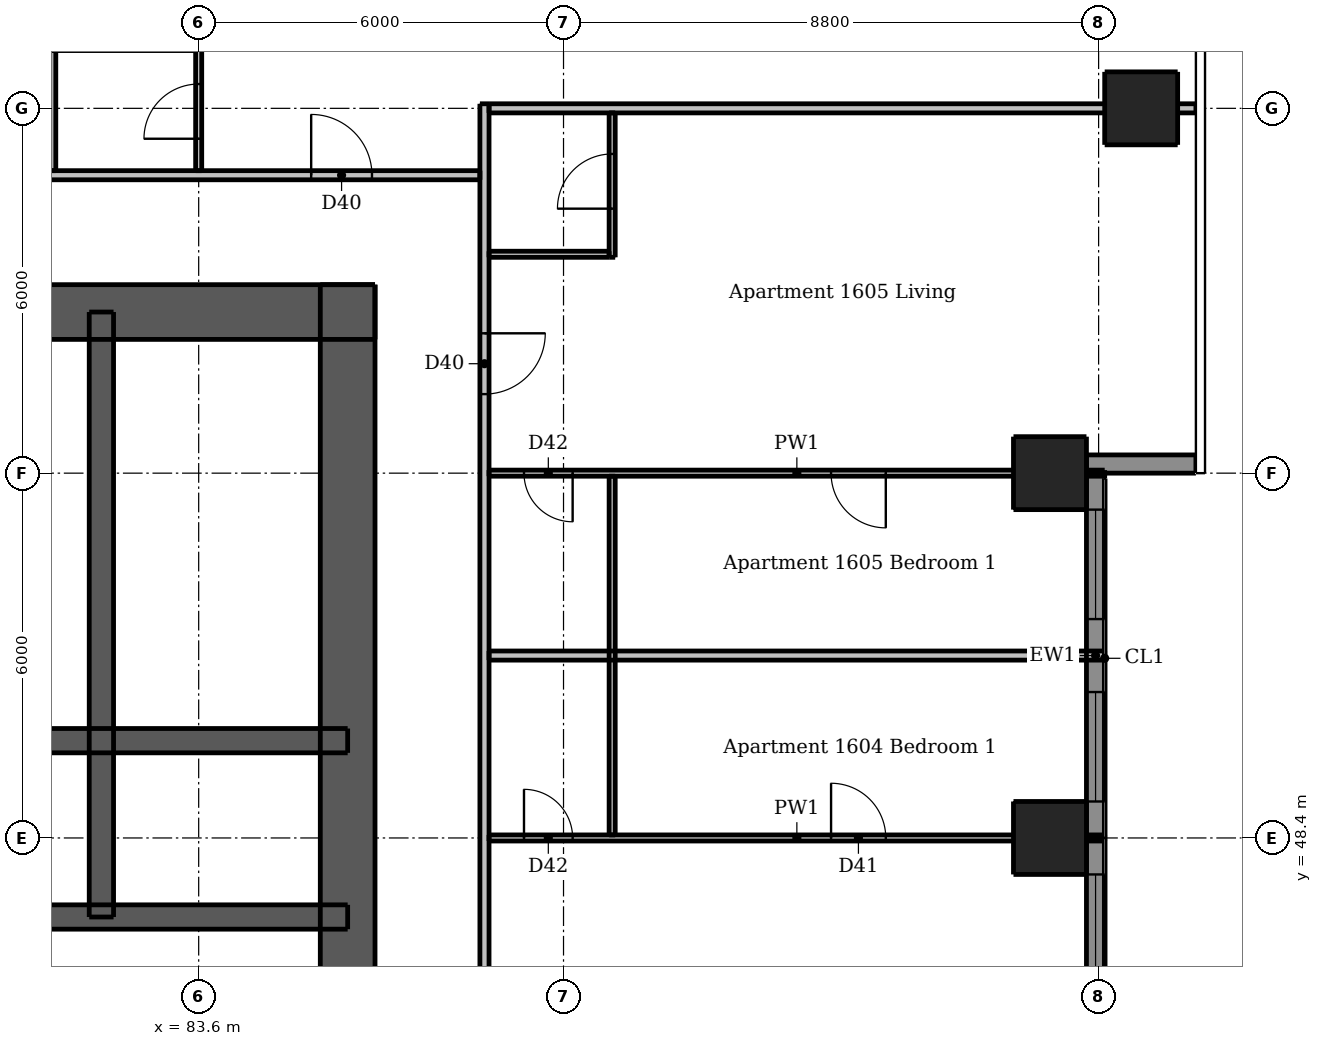
"""IFC4 building model, lengths in metres.
Left out: names, types, materials, properties, quantities, classifications, styles, units other than length and angle.
Written with IfcOpenShell. Run it as: python <this file> out.ifc"""

import sys

from ifc_helpers import new_model, si_unit, direction, frame, frame_2d, origin, origin_2d, place, context, subcontext, project, spatial, rectangle, extrude, element, fill, save


model = new_model("IFC4")
c1 = context("Model", 3, precision=1e-05, world=origin(), true_north=direction((0.0, 1.0)))
c2 = subcontext(c1, "Body", "Model", "MODEL_VIEW")
j1 = project(units=[si_unit("LENGTHUNIT", "METRE"), si_unit("PLANEANGLEUNIT", "RADIAN")], contexts=[c1])
p1 = place(None, origin())
s1 = spatial("IfcSite", under=j1, at=p1, CompositionType="ELEMENT")
p2 = place(p1, origin())
s2 = spatial("IfcBuilding", under=s1, at=p2, CompositionType="ELEMENT")
p3 = place(p2, frame((0.0, 0.0, 59.8)))
s3 = spatial("IfcBuildingStorey", under=s2, at=p3, CompositionType="ELEMENT", Elevation=59.8)
p4 = place(p3, frame((62.5, 57.05, 0.0), z_axis=(0.0, 0.0, 1.0), x_axis=(1.0, 0.0, 0.0)))
e1 = element("IfcWall", 1, at=p4, inside=s3, PredefinedType="SHEAR", context=c2, shape_type="SweptSolid", body=[
    extrude(rectangle(XDim=24.0, YDim=0.9, at=frame_2d((12.0, 0.0))), origin(), (0.0, 0.0, 1.0), 3.05),
])
p5 = place(p4, frame((20.85, 0.0, 0.0)))
e2 = element("IfcOpeningElement", 2, at=p5, cuts=e1, PredefinedType="OPENING", context=c2, shape_type="SweptSolid", body=[
    extrude(rectangle(XDim=1.1, YDim=2.1, at=frame_2d((0.55, 1.05))), frame((0.0, 0.46, 0.0), z_axis=(0.0, -1.0, 0.0), x_axis=(1.0, 0.0, 0.0)), (0.0, 0.0, 1.0), 0.92),
])
p6 = place(p4, frame((2.05, 0.0, 0.0)))
e3 = element("IfcOpeningElement", 3, at=p6, cuts=e1, PredefinedType="OPENING", context=c2, shape_type="SweptSolid", body=[
    extrude(rectangle(XDim=1.1, YDim=2.1, at=frame_2d((0.55, 1.05))), frame((0.0, 0.46, 0.0), z_axis=(0.0, -1.0, 0.0), x_axis=(1.0, 0.0, 0.0)), (0.0, 0.0, 1.0), 0.92),
])
p7 = place(p4, frame((6.44, 0.0, 0.0)))
e4 = element("IfcOpeningElement", 4, at=p7, cuts=e1, PredefinedType="OPENING", context=c2, shape_type="SweptSolid", body=[
    extrude(rectangle(XDim=0.9, YDim=2.1, at=frame_2d((0.45, 1.05))), frame((0.0, 0.46, 0.0), z_axis=(0.0, -1.0, 0.0), x_axis=(1.0, 0.0, 0.0)), (0.0, 0.0, 1.0), 0.92),
])
p8 = place(p4, frame((13.74, 0.0, 0.0)))
e5 = element("IfcOpeningElement", 5, at=p8, cuts=e1, PredefinedType="OPENING", context=c2, shape_type="SweptSolid", body=[
    extrude(rectangle(XDim=0.9, YDim=2.1, at=frame_2d((0.45, 1.05))), frame((0.0, 0.46, 0.0), z_axis=(0.0, -1.0, 0.0), x_axis=(1.0, 0.0, 0.0)), (0.0, 0.0, 1.0), 0.92),
])
p9 = place(p3, frame((86.05, 33.5, 0.0), z_axis=(0.0, 0.0, 1.0), x_axis=(0.0, 1.0, 0.0)))
e6 = element("IfcWall", 6, at=p9, inside=s3, PredefinedType="SHEAR", context=c2, shape_type="SweptSolid", body=[
    extrude(rectangle(XDim=24.0, YDim=0.9, at=frame_2d((12.0, 0.0))), origin(), (0.0, 0.0, 1.0), 3.05),
])
p10 = place(p9, frame((11.2, 0.0, 0.0)))
e7 = element("IfcOpeningElement", 7, at=p10, cuts=e6, PredefinedType="OPENING", context=c2, shape_type="SweptSolid", body=[
    extrude(rectangle(XDim=1.6, YDim=2.1, at=frame_2d((0.8, 1.05))), frame((0.0, 0.46, 0.0), z_axis=(0.0, -1.0, 0.0), x_axis=(1.0, 0.0, 0.0)), (0.0, 0.0, 1.0), 0.92),
])
p11 = place(p3, frame((62.95, 47.1, 0.0), z_axis=(0.0, 0.0, 1.0), x_axis=(1.0, 0.0, 0.0)))
e8 = element("IfcWall", 8, at=p11, inside=s3, PredefinedType="SHEAR", context=c2, shape_type="SweptSolid", body=[
    extrude(rectangle(XDim=23.1, YDim=0.4, at=frame_2d((11.55, 0.0))), origin(), (0.0, 0.0, 1.0), 3.05),
])
p12 = place(p11, frame((0.662, 0.0, 0.0)))
e9 = element("IfcOpeningElement", 9, at=p12, cuts=e8, PredefinedType="OPENING", context=c2, shape_type="SweptSolid", body=[
    extrude(rectangle(XDim=0.8, YDim=2.1, at=frame_2d((0.4, 1.05))), frame((0.0, 0.21, 0.0), z_axis=(0.0, -1.0, 0.0), x_axis=(1.0, 0.0, 0.0)), (0.0, 0.0, 1.0), 0.42),
])
p13 = place(p11, frame((2.312, 0.0, 0.0)))
e10 = element("IfcOpeningElement", 10, at=p13, cuts=e8, PredefinedType="OPENING", context=c2, shape_type="SweptSolid", body=[
    extrude(rectangle(XDim=0.9, YDim=2.1, at=frame_2d((0.45, 1.05))), frame((0.0, 0.21, 0.0), z_axis=(0.0, -1.0, 0.0), x_axis=(1.0, 0.0, 0.0)), (0.0, 0.0, 1.0), 0.42),
])
p14 = place(p11, frame((20.5, 0.0, 0.0)))
e11 = element("IfcOpeningElement", 11, at=p14, cuts=e8, PredefinedType="OPENING", context=c2, shape_type="SweptSolid", body=[
    extrude(rectangle(XDim=0.9, YDim=2.1, at=frame_2d((0.45, 1.05))), frame((0.0, 0.21, 0.0), z_axis=(0.0, -1.0, 0.0), x_axis=(1.0, 0.0, 0.0)), (0.0, 0.0, 1.0), 0.42),
])
p15 = place(p3, frame((62.95, 50.0, 0.0), z_axis=(0.0, 0.0, 1.0), x_axis=(1.0, 0.0, 0.0)))
e12 = element("IfcWall", 12, at=p15, inside=s3, PredefinedType="SHEAR", context=c2, shape_type="SweptSolid", body=[
    extrude(rectangle(XDim=23.1, YDim=0.4, at=frame_2d((11.55, 0.0))), origin(), (0.0, 0.0, 1.0), 3.05),
])
p16 = place(p3, frame((82.0, 47.1, 0.0), z_axis=(0.0, 0.0, 1.0), x_axis=(0.0, 1.0, 0.0)))
e13 = element("IfcWall", 13, at=p16, inside=s3, PredefinedType="SHEAR", context=c2, shape_type="SweptSolid", body=[
    extrude(rectangle(XDim=9.95, YDim=0.4, at=frame_2d((4.975, 0.0))), origin(), (0.0, 0.0, 1.0), 3.05),
])
for number, where, z_axis, x_axis in (
    (14, (97.6, 48.4, 0.0), (0.0, 0.0, 1.0), (1.0, 0.0, 0.0)),
    (15, (97.6, 54.4, 0.0), (0.0, 0.0, 1.0), (1.0, 0.0, 0.0)),
    (16, (99.1, 60.4, 0.0), (0.0, 0.0, 1.0), (1.0, 0.0, 0.0)),
):
    element("IfcColumn", number, at=place(p3, frame(where, z_axis=z_axis, x_axis=x_axis)), inside=s3, PredefinedType="COLUMN", context=c2, shape_type="SweptSolid", body=[
        extrude(rectangle(XDim=1.2, YDim=1.2, at=origin_2d()), origin(), (0.0, 0.0, 1.0), 3.05),
    ])
p17 = place(p3, frame((98.2, 54.55, 0.0), z_axis=(0.0, 0.0, 1.0), x_axis=(1.0, 0.0, 0.0)))
e17 = element("IfcWall", 17, at=p17, inside=s3, PredefinedType="SOLIDWALL", context=c2, shape_type="SweptSolid", body=[
    extrude(rectangle(XDim=1.8, YDim=0.3, at=frame_2d((0.9, 0.0))), origin(), (0.0, 0.0, 1.0), 3.05),
])
p18 = place(p3, frame((98.35, 42.7, 0.0), z_axis=(0.0, 0.0, 1.0), x_axis=(0.0, 1.0, 0.0)))
e18 = element("IfcWall", 18, at=p18, inside=s3, PredefinedType="SOLIDWALL", context=c2, shape_type="SweptSolid", body=[
    extrude(rectangle(XDim=5.7, YDim=0.3, at=frame_2d((2.85, 0.0))), origin(), (0.0, 0.0, 1.0), 3.05),
])
p19 = place(p18, frame((0.3, 0.0, 0.15)))
e19 = element("IfcOpeningElement", 19, at=p19, cuts=e18, PredefinedType="OPENING", context=c2, shape_type="SweptSolid", body=[
    extrude(rectangle(XDim=1.8, YDim=2.1, at=frame_2d((0.9, 1.05))), frame((0.0, 0.16, 0.0), z_axis=(0.0, -1.0, 0.0), x_axis=(1.0, 0.0, 0.0)), (0.0, 0.0, 1.0), 0.32),
])
p20 = place(p18, frame((3.3, 0.0, 0.15)))
e20 = element("IfcOpeningElement", 20, at=p20, cuts=e18, PredefinedType="OPENING", context=c2, shape_type="SweptSolid", body=[
    extrude(rectangle(XDim=1.8, YDim=2.1, at=frame_2d((0.9, 1.05))), frame((0.0, 0.16, 0.0), z_axis=(0.0, -1.0, 0.0), x_axis=(1.0, 0.0, 0.0)), (0.0, 0.0, 1.0), 0.32),
])
p21 = place(p3, frame((98.35, 48.4, 0.0), z_axis=(0.0, 0.0, 1.0), x_axis=(0.0, 1.0, 0.0)))
e21 = element("IfcWall", 21, at=p21, inside=s3, PredefinedType="SOLIDWALL", context=c2, shape_type="SweptSolid", body=[
    extrude(rectangle(XDim=6.0, YDim=0.3, at=frame_2d((3.0, 0.0))), origin(), (0.0, 0.0, 1.0), 3.05),
])
p22 = place(p21, frame((0.6, 0.0, 0.15)))
e22 = element("IfcOpeningElement", 22, at=p22, cuts=e21, PredefinedType="OPENING", context=c2, shape_type="SweptSolid", body=[
    extrude(rectangle(XDim=1.8, YDim=2.1, at=frame_2d((0.9, 1.05))), frame((0.0, 0.16, 0.0), z_axis=(0.0, -1.0, 0.0), x_axis=(1.0, 0.0, 0.0)), (0.0, 0.0, 1.0), 0.32),
])
p23 = place(p21, frame((3.6, 0.0, 0.15)))
e23 = element("IfcOpeningElement", 23, at=p23, cuts=e21, PredefinedType="OPENING", context=c2, shape_type="SweptSolid", body=[
    extrude(rectangle(XDim=1.8, YDim=2.1, at=frame_2d((0.9, 1.05))), frame((0.0, 0.16, 0.0), z_axis=(0.0, -1.0, 0.0), x_axis=(1.0, 0.0, 0.0)), (0.0, 0.0, 1.0), 0.32),
])
p24 = place(p3, frame((81.2, 59.375, 0.0), z_axis=(0.0, 0.0, 1.0), x_axis=(0.0, 1.0, 0.0)))
e24 = element("IfcWall", 24, at=p24, inside=s3, PredefinedType="PARTITIONING", context=c2, shape_type="SweptSolid", body=[
    extrude(rectangle(XDim=1.975, YDim=0.1, at=frame_2d((0.988, 0.0))), origin(), (0.0, 0.0, 1.0), 3.05),
])
p25 = place(p3, frame((83.6, 59.375, 0.0), z_axis=(0.0, 0.0, 1.0), x_axis=(0.0, 1.0, 0.0)))
e25 = element("IfcWall", 25, at=p25, inside=s3, PredefinedType="PARTITIONING", context=c2, shape_type="SweptSolid", body=[
    extrude(rectangle(XDim=8.625, YDim=0.1, at=frame_2d((4.312, 0.0))), origin(), (0.0, 0.0, 1.0), 2.516),
])
p26 = place(p25, frame((0.525, 0.0, 0.0)))
e26 = element("IfcOpeningElement", 26, at=p26, cuts=e25, PredefinedType="OPENING", context=c2, shape_type="SweptSolid", body=[
    extrude(rectangle(XDim=0.9, YDim=2.1, at=frame_2d((0.45, 1.05))), frame((0.0, 0.06, 0.0), z_axis=(0.0, -1.0, 0.0), x_axis=(1.0, 0.0, 0.0)), (0.0, 0.0, 1.0), 0.12),
])
p27 = place(p25, frame((4.875, 0.0, 0.0)))
e27 = element("IfcOpeningElement", 27, at=p27, cuts=e25, PredefinedType="OPENING", context=c2, shape_type="SweptSolid", body=[
    extrude(rectangle(XDim=0.9, YDim=2.1, at=frame_2d((0.45, 1.05))), frame((0.0, 0.06, 0.0), z_axis=(0.0, -1.0, 0.0), x_axis=(1.0, 0.0, 0.0)), (0.0, 0.0, 1.0), 0.12),
])
p28 = place(p3, frame((90.4, 48.45, 0.0), z_axis=(0.0, 0.0, 1.0), x_axis=(0.0, 1.0, 0.0)))
e28 = element("IfcWall", 28, at=p28, inside=s3, PredefinedType="PARTITIONING", context=c2, shape_type="SweptSolid", body=[
    extrude(rectangle(XDim=5.9, YDim=0.1, at=frame_2d((2.95, 0.0))), origin(), (0.0, 0.0, 1.0), 3.05),
])
p29 = place(p3, frame((90.4, 57.95, 0.0), z_axis=(0.0, 0.0, 1.0), x_axis=(0.0, 1.0, 0.0)))
e29 = element("IfcWall", 29, at=p29, inside=s3, PredefinedType="PARTITIONING", context=c2, shape_type="SweptSolid", body=[
    extrude(rectangle(XDim=2.375, YDim=0.1, at=frame_2d((1.188, 0.0))), origin(), (0.0, 0.0, 1.0), 3.05),
])
p30 = place(p29, frame((0.8, 0.0, 0.0)))
e30 = element("IfcOpeningElement", 30, at=p30, cuts=e29, PredefinedType="OPENING", context=c2, shape_type="SweptSolid", body=[
    extrude(rectangle(XDim=0.9, YDim=2.1, at=frame_2d((0.45, 1.05))), frame((0.0, 0.06, 0.0), z_axis=(0.0, -1.0, 0.0), x_axis=(1.0, 0.0, 0.0)), (0.0, 0.0, 1.0), 0.12),
])
p31 = place(p3, frame((88.375, 58.0, 0.0), z_axis=(0.0, 0.0, 1.0), x_axis=(1.0, 0.0, 0.0)))
e31 = element("IfcWall", 31, at=p31, inside=s3, PredefinedType="PARTITIONING", context=c2, shape_type="SweptSolid", body=[
    extrude(rectangle(XDim=1.975, YDim=0.1, at=frame_2d((0.988, 0.0))), origin(), (0.0, 0.0, 1.0), 3.05),
])
p32 = place(p3, frame((98.5, 54.4, 0.0), z_axis=(0.0, 0.0, 1.0), x_axis=(-1.0, 0.0, 0.0)))
e32 = element("IfcWall", 32, at=p32, inside=s3, PredefinedType="PARTITIONING", context=c2, shape_type="SweptSolid", body=[
    extrude(rectangle(XDim=10.125, YDim=0.1, at=frame_2d((5.062, 0.0))), origin(), (0.0, 0.0, 1.0), 2.516),
])
p33 = place(p32, frame((3.6, 0.0, 0.0)))
e33 = element("IfcOpeningElement", 33, at=p33, cuts=e32, PredefinedType="OPENING", context=c2, shape_type="SweptSolid", body=[
    extrude(rectangle(XDim=0.9, YDim=2.1, at=frame_2d((0.45, 1.05))), frame((0.0, 0.06, 0.0), z_axis=(0.0, -1.0, 0.0), x_axis=(1.0, 0.0, 0.0)), (0.0, 0.0, 1.0), 0.12),
])
p34 = place(p32, frame((8.75, 0.0, 0.0)))
e34 = element("IfcOpeningElement", 34, at=p34, cuts=e32, PredefinedType="OPENING", context=c2, shape_type="SweptSolid", body=[
    extrude(rectangle(XDim=0.8, YDim=2.1, at=frame_2d((0.4, 1.05))), frame((0.0, 0.06, 0.0), z_axis=(0.0, -1.0, 0.0), x_axis=(1.0, 0.0, 0.0)), (0.0, 0.0, 1.0), 0.12),
])
p35 = place(p3, frame((88.375, 48.4, 0.0), z_axis=(0.0, 0.0, 1.0), x_axis=(1.0, 0.0, 0.0)))
e35 = element("IfcWall", 35, at=p35, inside=s3, PredefinedType="PARTITIONING", context=c2, shape_type="SweptSolid", body=[
    extrude(rectangle(XDim=10.125, YDim=0.1, at=frame_2d((5.062, 0.0))), origin(), (0.0, 0.0, 1.0), 2.516),
])
p36 = place(p35, frame((5.625, 0.0, 0.0)))
e36 = element("IfcOpeningElement", 36, at=p36, cuts=e35, PredefinedType="OPENING", context=c2, shape_type="SweptSolid", body=[
    extrude(rectangle(XDim=0.9, YDim=2.1, at=frame_2d((0.45, 1.05))), frame((0.0, 0.06, 0.0), z_axis=(0.0, -1.0, 0.0), x_axis=(1.0, 0.0, 0.0)), (0.0, 0.0, 1.0), 0.12),
])
p37 = place(p35, frame((0.575, 0.0, 0.0)))
e37 = element("IfcOpeningElement", 37, at=p37, cuts=e35, PredefinedType="OPENING", context=c2, shape_type="SweptSolid", body=[
    extrude(rectangle(XDim=0.8, YDim=2.1, at=frame_2d((0.4, 1.05))), frame((0.0, 0.06, 0.0), z_axis=(0.0, -1.0, 0.0), x_axis=(1.0, 0.0, 0.0)), (0.0, 0.0, 1.0), 0.12),
])
p38 = place(p3, frame((88.3, 60.475, 0.0), z_axis=(0.0, 0.0, 1.0), x_axis=(0.0, -1.0, 0.0)))
e38 = element("IfcWall", 38, at=p38, inside=s3, PredefinedType="PARTITIONING", context=c2, shape_type="SweptSolid", body=[
    extrude(rectangle(XDim=28.7, YDim=0.15, at=frame_2d((14.35, 0.0))), origin(), (0.0, 0.0, 1.0), 3.05),
])
p39 = place(p38, frame((27.425, 0.0, 0.0)))
e39 = element("IfcOpeningElement", 39, at=p39, cuts=e38, PredefinedType="OPENING", context=c2, shape_type="SweptSolid", body=[
    extrude(rectangle(XDim=1.0, YDim=2.1, at=frame_2d((0.5, 1.05))), frame((0.0, 0.085, 0.0), z_axis=(0.0, -1.0, 0.0), x_axis=(1.0, 0.0, 0.0)), (0.0, 0.0, 1.0), 0.17),
])
p40 = place(p38, frame((14.525, 0.0, 0.0)))
e40 = element("IfcOpeningElement", 40, at=p40, cuts=e38, PredefinedType="OPENING", context=c2, shape_type="SweptSolid", body=[
    extrude(rectangle(XDim=1.0, YDim=2.1, at=frame_2d((0.5, 1.05))), frame((0.0, 0.085, 0.0), z_axis=(0.0, -1.0, 0.0), x_axis=(1.0, 0.0, 0.0)), (0.0, 0.0, 1.0), 0.17),
])
p41 = place(p38, frame((3.775, 0.0, 0.0)))
e41 = element("IfcOpeningElement", 41, at=p41, cuts=e38, PredefinedType="OPENING", context=c2, shape_type="SweptSolid", body=[
    extrude(rectangle(XDim=1.0, YDim=2.1, at=frame_2d((0.5, 1.05))), frame((0.0, 0.085, 0.0), z_axis=(0.0, -1.0, 0.0), x_axis=(1.0, 0.0, 0.0)), (0.0, 0.0, 1.0), 0.17),
])
p42 = place(p3, frame((88.375, 60.4, 0.0), z_axis=(0.0, 0.0, 1.0), x_axis=(1.0, 0.0, 0.0)))
e42 = element("IfcWall", 42, at=p42, inside=s3, PredefinedType="PARTITIONING", context=c2, shape_type="SweptSolid", body=[
    extrude(rectangle(XDim=11.625, YDim=0.15, at=frame_2d((5.812, 0.0))), origin(), (0.0, 0.0, 1.0), 2.516),
])
p43 = place(p3, frame((59.675, 59.3, 0.0), z_axis=(0.0, 0.0, 1.0), x_axis=(1.0, 0.0, 0.0)))
e43 = element("IfcWall", 43, at=p43, inside=s3, PredefinedType="PARTITIONING", context=c2, shape_type="SweptSolid", body=[
    extrude(rectangle(XDim=28.55, YDim=0.15, at=frame_2d((14.275, 0.0))), origin(), (0.0, 0.0, 1.0), 3.05),
])
p44 = place(p43, frame((3.625, 0.0, 0.0)))
e44 = element("IfcOpeningElement", 44, at=p44, cuts=e43, PredefinedType="OPENING", context=c2, shape_type="SweptSolid", body=[
    extrude(rectangle(XDim=1.0, YDim=2.1, at=frame_2d((0.5, 1.05))), frame((0.0, 0.085, 0.0), z_axis=(0.0, -1.0, 0.0), x_axis=(1.0, 0.0, 0.0)), (0.0, 0.0, 1.0), 0.17),
])
p45 = place(p43, frame((14.425, 0.0, 0.0)))
e45 = element("IfcOpeningElement", 45, at=p45, cuts=e43, PredefinedType="OPENING", context=c2, shape_type="SweptSolid", body=[
    extrude(rectangle(XDim=1.0, YDim=2.1, at=frame_2d((0.5, 1.05))), frame((0.0, 0.085, 0.0), z_axis=(0.0, -1.0, 0.0), x_axis=(1.0, 0.0, 0.0)), (0.0, 0.0, 1.0), 0.17),
])
p46 = place(p43, frame((25.775, 0.0, 0.0)))
e46 = element("IfcOpeningElement", 46, at=p46, cuts=e43, PredefinedType="OPENING", context=c2, shape_type="SweptSolid", body=[
    extrude(rectangle(XDim=1.0, YDim=2.1, at=frame_2d((0.5, 1.05))), frame((0.0, 0.085, 0.0), z_axis=(0.0, -1.0, 0.0), x_axis=(1.0, 0.0, 0.0)), (0.0, 0.0, 1.0), 0.17),
])
p47 = place(p3, frame((88.375, 51.4, 0.0), z_axis=(0.0, 0.0, 1.0), x_axis=(1.0, 0.0, 0.0)))
e47 = element("IfcWall", 47, at=p47, inside=s3, PredefinedType="PARTITIONING", context=c2, shape_type="SweptSolid", body=[
    extrude(rectangle(XDim=10.125, YDim=0.15, at=frame_2d((5.062, 0.0))), origin(), (0.0, 0.0, 1.0), 3.05),
])
p48 = place(p20, origin())
e48 = element("IfcWindow", 48, at=p48, inside=s3, PartitioningType="DOUBLE_PANEL_VERTICAL", PredefinedType="WINDOW", context=c2, shape_type="SweptSolid", body=[
    extrude(rectangle(XDim=1.8, YDim=2.1, at=frame_2d((0.9, 1.05))), frame((0.0, 0.03, 0.0), z_axis=(0.0, -1.0, 0.0), x_axis=(1.0, 0.0, 0.0)), (0.0, 0.0, 1.0), 0.06),
])
fill(e20, e48)
p49 = place(p22, origin())
e49 = element("IfcWindow", 49, at=p49, inside=s3, PartitioningType="DOUBLE_PANEL_VERTICAL", PredefinedType="WINDOW", context=c2, shape_type="SweptSolid", body=[
    extrude(rectangle(XDim=1.8, YDim=2.1, at=frame_2d((0.9, 1.05))), frame((0.0, 0.03, 0.0), z_axis=(0.0, -1.0, 0.0), x_axis=(1.0, 0.0, 0.0)), (0.0, 0.0, 1.0), 0.06),
])
fill(e22, e49)
p50 = place(p23, origin())
e50 = element("IfcWindow", 50, at=p50, inside=s3, PartitioningType="DOUBLE_PANEL_VERTICAL", PredefinedType="WINDOW", context=c2, shape_type="SweptSolid", body=[
    extrude(rectangle(XDim=1.8, YDim=2.1, at=frame_2d((0.9, 1.05))), frame((0.0, 0.03, 0.0), z_axis=(0.0, -1.0, 0.0), x_axis=(1.0, 0.0, 0.0)), (0.0, 0.0, 1.0), 0.06),
])
fill(e23, e50)
p51 = place(p5, origin())
e51 = element("IfcDoor", 51, at=p51, inside=s3, OperationType="SINGLE_SWING_RIGHT", PredefinedType="DOOR", context=c2, shape_type="SweptSolid", body=[
    extrude(rectangle(XDim=1.1, YDim=2.1, at=frame_2d((0.55, 1.05))), frame((0.0, -0.388, 0.0), z_axis=(0.0, -1.0, 0.0), x_axis=(1.0, 0.0, 0.0)), (0.0, 0.0, 1.0), 0.05),
])
fill(e2, e51)
p52 = place(p14, origin())
e52 = element("IfcDoor", 52, at=p52, inside=s3, OperationType="SINGLE_SWING_LEFT", PredefinedType="DOOR", context=c2, shape_type="SweptSolid", body=[
    extrude(rectangle(XDim=0.9, YDim=2.1, at=frame_2d((0.45, 1.05))), frame((0.0, 0.188, 0.0), z_axis=(0.0, -1.0, 0.0), x_axis=(1.0, 0.0, 0.0)), (0.0, 0.0, 1.0), 0.05),
])
fill(e11, e52)
p53 = place(p36, origin())
e53 = element("IfcDoor", 53, at=p53, inside=s3, OperationType="SINGLE_SWING_LEFT", PredefinedType="DOOR", context=c2, shape_type="SweptSolid", body=[
    extrude(rectangle(XDim=0.9, YDim=2.1, at=frame_2d((0.45, 1.05))), frame((0.0, 0.025, 0.0), z_axis=(0.0, -1.0, 0.0), x_axis=(1.0, 0.0, 0.0)), (0.0, 0.0, 1.0), 0.05),
])
fill(e36, e53)
p54 = place(p37, origin())
e54 = element("IfcDoor", 54, at=p54, inside=s3, OperationType="SINGLE_SWING_LEFT", PredefinedType="DOOR", context=c2, shape_type="SweptSolid", body=[
    extrude(rectangle(XDim=0.8, YDim=2.1, at=frame_2d((0.4, 1.05))), frame((0.0, 0.025, 0.0), z_axis=(0.0, -1.0, 0.0), x_axis=(1.0, 0.0, 0.0)), (0.0, 0.0, 1.0), 0.05),
])
fill(e37, e54)
p55 = place(p41, origin())
e55 = element("IfcDoor", 55, at=p55, inside=s3, OperationType="SINGLE_SWING_LEFT", PredefinedType="DOOR", context=c2, shape_type="SweptSolid", body=[
    extrude(rectangle(XDim=1.0, YDim=2.1, at=frame_2d((0.5, 1.05))), frame((0.0, 0.025, 0.0), z_axis=(0.0, -1.0, 0.0), x_axis=(1.0, 0.0, 0.0)), (0.0, 0.0, 1.0), 0.05),
])
fill(e41, e55)
p56 = place(p30, origin())
e56 = element("IfcDoor", 56, at=p56, inside=s3, OperationType="SINGLE_SWING_LEFT", PredefinedType="DOOR", context=c2, shape_type="SweptSolid", body=[
    extrude(rectangle(XDim=0.9, YDim=2.1, at=frame_2d((0.45, 1.05))), frame((0.0, 0.025, 0.0), z_axis=(0.0, -1.0, 0.0), x_axis=(1.0, 0.0, 0.0)), (0.0, 0.0, 1.0), 0.05),
])
fill(e30, e56)
p57 = place(p33, origin())
e57 = element("IfcDoor", 57, at=p57, inside=s3, OperationType="SINGLE_SWING_LEFT", PredefinedType="DOOR", context=c2, shape_type="SweptSolid", body=[
    extrude(rectangle(XDim=0.9, YDim=2.1, at=frame_2d((0.45, 1.05))), frame((0.0, 0.025, 0.0), z_axis=(0.0, -1.0, 0.0), x_axis=(1.0, 0.0, 0.0)), (0.0, 0.0, 1.0), 0.05),
])
fill(e33, e57)
p58 = place(p34, origin())
e58 = element("IfcDoor", 58, at=p58, inside=s3, OperationType="SINGLE_SWING_LEFT", PredefinedType="DOOR", context=c2, shape_type="SweptSolid", body=[
    extrude(rectangle(XDim=0.8, YDim=2.1, at=frame_2d((0.4, 1.05))), frame((0.0, 0.025, 0.0), z_axis=(0.0, -1.0, 0.0), x_axis=(1.0, 0.0, 0.0)), (0.0, 0.0, 1.0), 0.05),
])
fill(e34, e58)
p59 = place(p46, origin())
e59 = element("IfcDoor", 59, at=p59, inside=s3, OperationType="SINGLE_SWING_LEFT", PredefinedType="DOOR", context=c2, shape_type="SweptSolid", body=[
    extrude(rectangle(XDim=1.0, YDim=2.1, at=frame_2d((0.5, 1.05))), frame((0.0, 0.025, 0.0), z_axis=(0.0, -1.0, 0.0), x_axis=(1.0, 0.0, 0.0)), (0.0, 0.0, 1.0), 0.05),
])
fill(e46, e59)
p60 = place(p26, origin())
e60 = element("IfcDoor", 60, at=p60, inside=s3, OperationType="SINGLE_SWING_LEFT", PredefinedType="DOOR", context=c2, shape_type="SweptSolid", body=[
    extrude(rectangle(XDim=0.9, YDim=2.1, at=frame_2d((0.45, 1.05))), frame((0.0, 0.025, 0.0), z_axis=(0.0, -1.0, 0.0), x_axis=(1.0, 0.0, 0.0)), (0.0, 0.0, 1.0), 0.05),
])
fill(e26, e60)
save(model, sys.argv[1])
